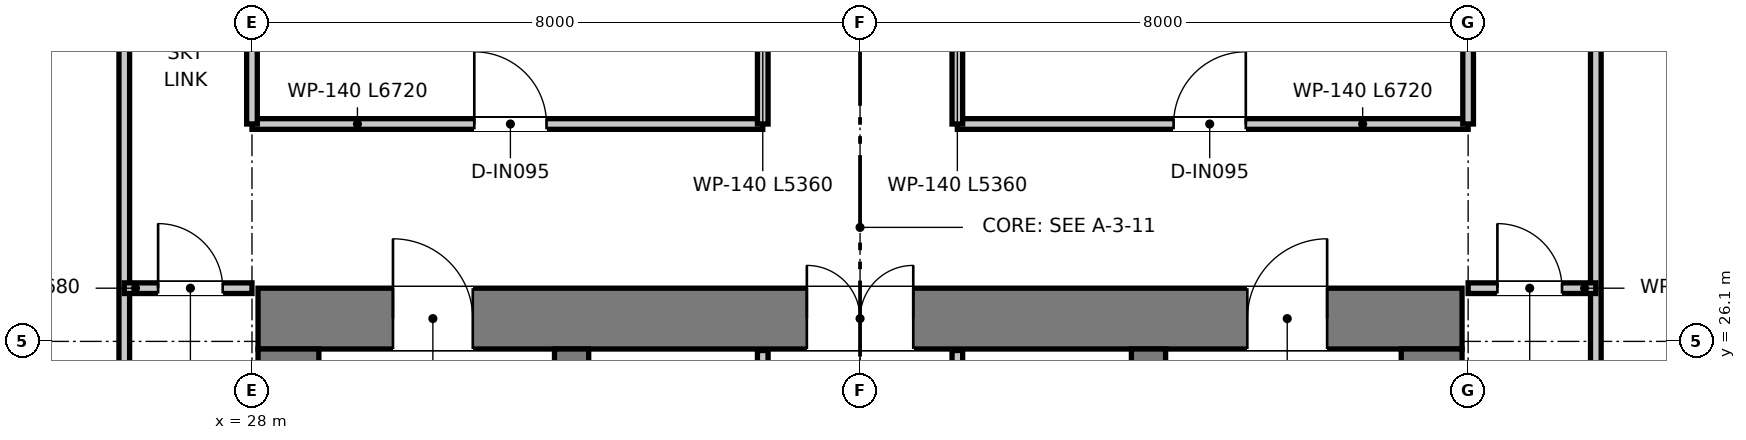
"""IFC4 building model, lengths in metres.
Left out: names, types, materials, properties, quantities, classifications, styles, units other than length and angle.
Written with IfcOpenShell. Run it as: python <this file> out.ifc"""

import sys

from ifc_helpers import new_model, si_unit, direction, frame, frame_2d, origin, place, context, subcontext, project, spatial, rectangle, extrude, element, fill, save


model = new_model("IFC4")
c1 = context("Model", 3, precision=1e-05, world=origin(), true_north=direction((0.0, 1.0)))
c2 = subcontext(c1, "Body", "Model", "MODEL_VIEW")
j1 = project(units=[si_unit("LENGTHUNIT", "METRE"), si_unit("PLANEANGLEUNIT", "RADIAN")], contexts=[c1])
p1 = place(None, origin())
s1 = spatial("IfcSite", under=j1, at=p1, CompositionType="ELEMENT")
p2 = place(p1, origin())
s2 = spatial("IfcBuilding", under=s1, at=p2, CompositionType="ELEMENT")
p3 = place(p2, frame((0.0, 0.0, 141.4)))
s3 = spatial("IfcBuildingStorey", under=s2, at=p3, CompositionType="ELEMENT", Elevation=141.4)
p4 = place(p3, frame((28.08, 26.4, 0.0), z_axis=(0.0, 0.0, 1.0), x_axis=(1.0, 0.0, 0.0)))
e1 = element("IfcWall", 1, at=p4, inside=s3, PredefinedType="SHEAR", context=c2, shape_type="SweptSolid", body=[
    extrude(rectangle(XDim=15.84, YDim=0.8, at=frame_2d((7.92, 0.0))), origin(), (0.0, 0.0, 1.0), 4.8),
])
p5 = place(p4, frame((7.22, 0.0, 0.0)))
e2 = element("IfcOpeningElement", 2, at=p5, cuts=e1, PredefinedType="OPENING", context=c2, shape_type="SweptSolid", body=[
    extrude(rectangle(XDim=1.4, YDim=2.2, at=frame_2d((0.7, 1.1))), frame((0.0, 0.41, 0.0), z_axis=(0.0, -1.0, 0.0), x_axis=(1.0, 0.0, 0.0)), (0.0, 0.0, 1.0), 0.82),
])
p6 = place(p4, frame((1.775, 0.0, 0.0)))
e3 = element("IfcOpeningElement", 3, at=p6, cuts=e1, PredefinedType="OPENING", context=c2, shape_type="SweptSolid", body=[
    extrude(rectangle(XDim=1.05, YDim=2.1, at=frame_2d((0.525, 1.05))), frame((0.0, 0.41, 0.0), z_axis=(0.0, -1.0, 0.0), x_axis=(1.0, 0.0, 0.0)), (0.0, 0.0, 1.0), 0.82),
])
p7 = place(p4, frame((13.015, 0.0, 0.0)))
e4 = element("IfcOpeningElement", 4, at=p7, cuts=e1, PredefinedType="OPENING", context=c2, shape_type="SweptSolid", body=[
    extrude(rectangle(XDim=1.05, YDim=2.1, at=frame_2d((0.525, 1.05))), frame((0.0, 0.41, 0.0), z_axis=(0.0, -1.0, 0.0), x_axis=(1.0, 0.0, 0.0)), (0.0, 0.0, 1.0), 0.82),
])
for number, where, z_axis, x_axis in (
    (5, (28.48, 11.3, 0.0), (0.0, 0.0, 1.0), (0.0, 1.0, 0.0)),
    (6, (43.52, 11.3, 0.0), (0.0, 0.0, 1.0), (0.0, 1.0, 0.0)),
):
    element("IfcWall", number, at=place(p3, frame(where, z_axis=z_axis, x_axis=x_axis)), inside=s3, PredefinedType="SHEAR", context=c2, shape_type="SweptSolid", body=[
        extrude(rectangle(XDim=14.7, YDim=0.8, at=frame_2d((7.35, 0.0))), origin(), (0.0, 0.0, 1.0), 4.8),
    ])
p8 = place(p3, frame((32.205, 13.22, 0.0), z_axis=(0.0, 0.0, 1.0), x_axis=(0.0, 1.0, 0.0)))
e7 = element("IfcWall", 7, at=p8, inside=s3, PredefinedType="SHEAR", context=c2, shape_type="SweptSolid", body=[
    extrude(rectangle(XDim=12.78, YDim=0.45, at=frame_2d((6.39, 0.0))), origin(), (0.0, 0.0, 1.0), 4.8),
])
p9 = place(p8, frame((10.58, 0.0, 0.0)))
e8 = element("IfcOpeningElement", 8, at=p9, cuts=e7, PredefinedType="OPENING", context=c2, shape_type="SweptSolid", body=[
    extrude(rectangle(XDim=1.1, YDim=2.15, at=frame_2d((0.55, 1.075))), frame((0.0, 0.235, 0.0), z_axis=(0.0, -1.0, 0.0), x_axis=(1.0, 0.0, 0.0)), (0.0, 0.0, 1.0), 0.47),
])
p10 = place(p3, frame((39.795, 13.22, 0.0), z_axis=(0.0, 0.0, 1.0), x_axis=(0.0, 1.0, 0.0)))
e9 = element("IfcWall", 9, at=p10, inside=s3, PredefinedType="SHEAR", context=c2, shape_type="SweptSolid", body=[
    extrude(rectangle(XDim=12.78, YDim=0.45, at=frame_2d((6.39, 0.0))), origin(), (0.0, 0.0, 1.0), 4.8),
])
p11 = place(p10, frame((10.58, 0.0, 0.0)))
e10 = element("IfcOpeningElement", 10, at=p11, cuts=e9, PredefinedType="OPENING", context=c2, shape_type="SweptSolid", body=[
    extrude(rectangle(XDim=1.1, YDim=2.15, at=frame_2d((0.55, 1.075))), frame((0.0, 0.235, 0.0), z_axis=(0.0, -1.0, 0.0), x_axis=(1.0, 0.0, 0.0)), (0.0, 0.0, 1.0), 0.47),
])
p12 = place(p3, frame((34.72, 20.2, 0.0), z_axis=(0.0, 0.0, 1.0), x_axis=(0.0, 1.0, 0.0)))
e11 = element("IfcWall", 11, at=p12, inside=s3, PredefinedType="PARTITIONING", context=c2, shape_type="SweptSolid", body=[
    extrude(rectangle(XDim=5.78, YDim=0.14, at=frame_2d((2.89, 0.0))), origin(), (0.0, 0.0, 1.0), 3.52),
])
p13 = place(p12, frame((1.05, 0.0, 0.0)))
e12 = element("IfcOpeningElement", 12, at=p13, cuts=e11, PredefinedType="OPENING", context=c2, shape_type="SweptSolid", body=[
    extrude(rectangle(XDim=0.9, YDim=2.1, at=frame_2d((0.45, 1.05))), frame((0.0, 0.08, 0.0), z_axis=(0.0, -1.0, 0.0), x_axis=(1.0, 0.0, 0.0)), (0.0, 0.0, 1.0), 0.16),
])
p14 = place(p3, frame((37.28, 20.2, 0.0), z_axis=(0.0, 0.0, 1.0), x_axis=(0.0, 1.0, 0.0)))
e13 = element("IfcWall", 13, at=p14, inside=s3, PredefinedType="PARTITIONING", context=c2, shape_type="SweptSolid", body=[
    extrude(rectangle(XDim=5.78, YDim=0.14, at=frame_2d((2.89, 0.0))), origin(), (0.0, 0.0, 1.0), 3.52),
])
p15 = place(p14, frame((0.95, 0.0, 0.0)))
e14 = element("IfcOpeningElement", 14, at=p15, cuts=e13, PredefinedType="OPENING", context=c2, shape_type="SweptSolid", body=[
    extrude(rectangle(XDim=1.1, YDim=2.15, at=frame_2d((0.55, 1.075))), frame((0.0, 0.08, 0.0), z_axis=(0.0, -1.0, 0.0), x_axis=(1.0, 0.0, 0.0)), (0.0, 0.0, 1.0), 0.16),
])
p16 = place(p3, frame((28.0, 28.96, 0.0), z_axis=(0.0, 0.0, 1.0), x_axis=(1.0, 0.0, 0.0)))
e15 = element("IfcWall", 15, at=p16, inside=s3, PredefinedType="PARTITIONING", context=c2, shape_type="SweptSolid", body=[
    extrude(rectangle(XDim=6.72, YDim=0.14, at=frame_2d((3.36, 0.0))), origin(), (0.0, 0.0, 1.0), 3.93),
])
p17 = place(p16, frame((2.925, 0.0, 0.0)))
e16 = element("IfcOpeningElement", 16, at=p17, cuts=e15, PredefinedType="OPENING", context=c2, shape_type="SweptSolid", body=[
    extrude(rectangle(XDim=0.95, YDim=2.1, at=frame_2d((0.475, 1.05))), frame((0.0, 0.08, 0.0), z_axis=(0.0, -1.0, 0.0), x_axis=(1.0, 0.0, 0.0)), (0.0, 0.0, 1.0), 0.16),
])
p18 = place(p3, frame((37.28, 28.96, 0.0), z_axis=(0.0, 0.0, 1.0), x_axis=(1.0, 0.0, 0.0)))
e17 = element("IfcWall", 17, at=p18, inside=s3, PredefinedType="PARTITIONING", context=c2, shape_type="SweptSolid", body=[
    extrude(rectangle(XDim=6.72, YDim=0.14, at=frame_2d((3.36, 0.0))), origin(), (0.0, 0.0, 1.0), 3.93),
])
p19 = place(p18, frame((2.845, 0.0, 0.0)))
e18 = element("IfcOpeningElement", 18, at=p19, cuts=e17, PredefinedType="OPENING", context=c2, shape_type="SweptSolid", body=[
    extrude(rectangle(XDim=0.95, YDim=2.1, at=frame_2d((0.475, 1.05))), frame((0.0, 0.08, 0.0), z_axis=(0.0, -1.0, 0.0), x_axis=(1.0, 0.0, 0.0)), (0.0, 0.0, 1.0), 0.16),
])
for number, where, z_axis, x_axis in (
    (19, (34.72, 28.96, 0.0), (0.0, 0.0, 1.0), (0.0, 1.0, 0.0)),
    (20, (37.28, 28.96, 0.0), (0.0, 0.0, 1.0), (0.0, 1.0, 0.0)),
):
    element("IfcWall", number, at=place(p3, frame(where, z_axis=z_axis, x_axis=x_axis)), inside=s3, PredefinedType="PARTITIONING", context=c2, shape_type="SweptSolid", body=[
        extrude(rectangle(XDim=5.36, YDim=0.14, at=frame_2d((2.68, 0.0))), origin(), (0.0, 0.0, 1.0), 4.02),
    ])
for number, where, z_axis, x_axis in (
    (21, (28.0, 28.96, 0.0), (0.0, 0.0, 1.0), (0.0, 1.0, 0.0)),
    (22, (44.0, 28.96, 0.0), (0.0, 0.0, 1.0), (0.0, 1.0, 0.0)),
):
    element("IfcWall", number, at=place(p3, frame(where, z_axis=z_axis, x_axis=x_axis)), inside=s3, PredefinedType="PARTITIONING", context=c2, shape_type="SweptSolid", body=[
        extrude(rectangle(XDim=5.36, YDim=0.14, at=frame_2d((2.68, 0.0))), origin(), (0.0, 0.0, 1.0), 4.12),
    ])
p20 = place(p3, frame((26.32, 10.5, 0.0), z_axis=(0.0, 0.0, 1.0), x_axis=(0.0, 1.0, 0.0)))
e23 = element("IfcWall", 23, at=p20, inside=s3, PredefinedType="PARTITIONING", context=c2, shape_type="SweptSolid", body=[
    extrude(rectangle(XDim=42.135, YDim=0.14, at=frame_2d((21.067, 0.0))), origin(), (0.0, 0.0, 1.0), 3.82),
])
p21 = place(p20, frame((20.45, 0.0, 0.0)))
e24 = element("IfcOpeningElement", 24, at=p21, cuts=e23, PredefinedType="OPENING", context=c2, shape_type="SweptSolid", body=[
    extrude(rectangle(XDim=1.1, YDim=2.15, at=frame_2d((0.55, 1.075))), frame((0.0, 0.08, 0.0), z_axis=(0.0, -1.0, 0.0), x_axis=(1.0, 0.0, 0.0)), (0.0, 0.0, 1.0), 0.16),
])
p22 = place(p3, frame((45.68, 0.765, 0.0), z_axis=(0.0, 0.0, 1.0), x_axis=(0.0, 1.0, 0.0)))
e25 = element("IfcWall", 25, at=p22, inside=s3, PredefinedType="PARTITIONING", context=c2, shape_type="SweptSolid", body=[
    extrude(rectangle(XDim=47.145, YDim=0.14, at=frame_2d((23.573, 0.0))), origin(), (0.0, 0.0, 1.0), 3.82),
])
p23 = place(p22, frame((30.185, 0.0, 0.0)))
e26 = element("IfcOpeningElement", 26, at=p23, cuts=e25, PredefinedType="OPENING", context=c2, shape_type="SweptSolid", body=[
    extrude(rectangle(XDim=1.1, YDim=2.15, at=frame_2d((0.55, 1.075))), frame((0.0, 0.08, 0.0), z_axis=(0.0, -1.0, 0.0), x_axis=(1.0, 0.0, 0.0)), (0.0, 0.0, 1.0), 0.16),
])
p24 = place(p3, frame((26.32, 26.8, 0.0), z_axis=(0.0, 0.0, 1.0), x_axis=(1.0, 0.0, 0.0)))
e27 = element("IfcWall", 27, at=p24, inside=s3, PredefinedType="PARTITIONING", context=c2, shape_type="SweptSolid", body=[
    extrude(rectangle(XDim=1.68, YDim=0.14, at=frame_2d((0.84, 0.0))), origin(), (0.0, 0.0, 1.0), 3.93),
])
p25 = place(p24, frame((0.445, 0.0, 0.0)))
e28 = element("IfcOpeningElement", 28, at=p25, cuts=e27, PredefinedType="OPENING", context=c2, shape_type="SweptSolid", body=[
    extrude(rectangle(XDim=0.85, YDim=2.1, at=frame_2d((0.425, 1.05))), frame((0.0, 0.08, 0.0), z_axis=(0.0, -1.0, 0.0), x_axis=(1.0, 0.0, 0.0)), (0.0, 0.0, 1.0), 0.16),
])
p26 = place(p3, frame((44.0, 26.8, 0.0), z_axis=(0.0, 0.0, 1.0), x_axis=(1.0, 0.0, 0.0)))
e29 = element("IfcWall", 29, at=p26, inside=s3, PredefinedType="PARTITIONING", context=c2, shape_type="SweptSolid", body=[
    extrude(rectangle(XDim=1.68, YDim=0.14, at=frame_2d((0.84, 0.0))), origin(), (0.0, 0.0, 1.0), 3.93),
])
p27 = place(p26, frame((0.385, 0.0, 0.0)))
e30 = element("IfcOpeningElement", 30, at=p27, cuts=e29, PredefinedType="OPENING", context=c2, shape_type="SweptSolid", body=[
    extrude(rectangle(XDim=0.85, YDim=2.1, at=frame_2d((0.425, 1.05))), frame((0.0, 0.08, 0.0), z_axis=(0.0, -1.0, 0.0), x_axis=(1.0, 0.0, 0.0)), (0.0, 0.0, 1.0), 0.16),
])
p28 = place(p5, origin())
e31 = element("IfcDoor", 31, at=p28, inside=s3, OperationType="DOUBLE_DOOR_SINGLE_SWING", PredefinedType="DOOR", context=c2, shape_type="SweptSolid", body=[
    extrude(rectangle(XDim=1.4, YDim=2.2, at=frame_2d((0.7, 1.1))), frame((0.0, 0.025, 0.0), z_axis=(0.0, -1.0, 0.0), x_axis=(1.0, 0.0, 0.0)), (0.0, 0.0, 1.0), 0.05),
])
fill(e2, e31)
p29 = place(p6, origin())
e32 = element("IfcDoor", 32, at=p29, inside=s3, OperationType="SINGLE_SWING_LEFT", PredefinedType="DOOR", context=c2, shape_type="SweptSolid", body=[
    extrude(rectangle(XDim=1.05, YDim=2.1, at=frame_2d((0.525, 1.05))), frame((0.0, 0.025, 0.0), z_axis=(0.0, -1.0, 0.0), x_axis=(1.0, 0.0, 0.0)), (0.0, 0.0, 1.0), 0.05),
])
fill(e3, e32)
p30 = place(p7, origin())
e33 = element("IfcDoor", 33, at=p30, inside=s3, OperationType="SINGLE_SWING_RIGHT", PredefinedType="DOOR", context=c2, shape_type="SweptSolid", body=[
    extrude(rectangle(XDim=1.05, YDim=2.1, at=frame_2d((0.525, 1.05))), frame((0.0, 0.025, 0.0), z_axis=(0.0, -1.0, 0.0), x_axis=(1.0, 0.0, 0.0)), (0.0, 0.0, 1.0), 0.05),
])
fill(e4, e33)
p31 = place(p17, origin())
e34 = element("IfcDoor", 34, at=p31, inside=s3, OperationType="SINGLE_SWING_LEFT", PredefinedType="DOOR", context=c2, shape_type="SweptSolid", body=[
    extrude(rectangle(XDim=0.95, YDim=2.1, at=frame_2d((0.475, 1.05))), frame((0.0, 0.025, 0.0), z_axis=(0.0, -1.0, 0.0), x_axis=(1.0, 0.0, 0.0)), (0.0, 0.0, 1.0), 0.05),
])
fill(e16, e34)
p32 = place(p19, origin())
e35 = element("IfcDoor", 35, at=p32, inside=s3, OperationType="SINGLE_SWING_RIGHT", PredefinedType="DOOR", context=c2, shape_type="SweptSolid", body=[
    extrude(rectangle(XDim=0.95, YDim=2.1, at=frame_2d((0.475, 1.05))), frame((0.0, 0.025, 0.0), z_axis=(0.0, -1.0, 0.0), x_axis=(1.0, 0.0, 0.0)), (0.0, 0.0, 1.0), 0.05),
])
fill(e18, e35)
p33 = place(p25, origin())
e36 = element("IfcDoor", 36, at=p33, inside=s3, OperationType="SINGLE_SWING_LEFT", PredefinedType="DOOR", context=c2, shape_type="SweptSolid", body=[
    extrude(rectangle(XDim=0.85, YDim=2.1, at=frame_2d((0.425, 1.05))), frame((0.0, 0.025, 0.0), z_axis=(0.0, -1.0, 0.0), x_axis=(1.0, 0.0, 0.0)), (0.0, 0.0, 1.0), 0.05),
])
fill(e28, e36)
p34 = place(p27, origin())
e37 = element("IfcDoor", 37, at=p34, inside=s3, OperationType="SINGLE_SWING_LEFT", PredefinedType="DOOR", context=c2, shape_type="SweptSolid", body=[
    extrude(rectangle(XDim=0.85, YDim=2.1, at=frame_2d((0.425, 1.05))), frame((0.0, 0.025, 0.0), z_axis=(0.0, -1.0, 0.0), x_axis=(1.0, 0.0, 0.0)), (0.0, 0.0, 1.0), 0.05),
])
fill(e30, e37)
save(model, sys.argv[1])
